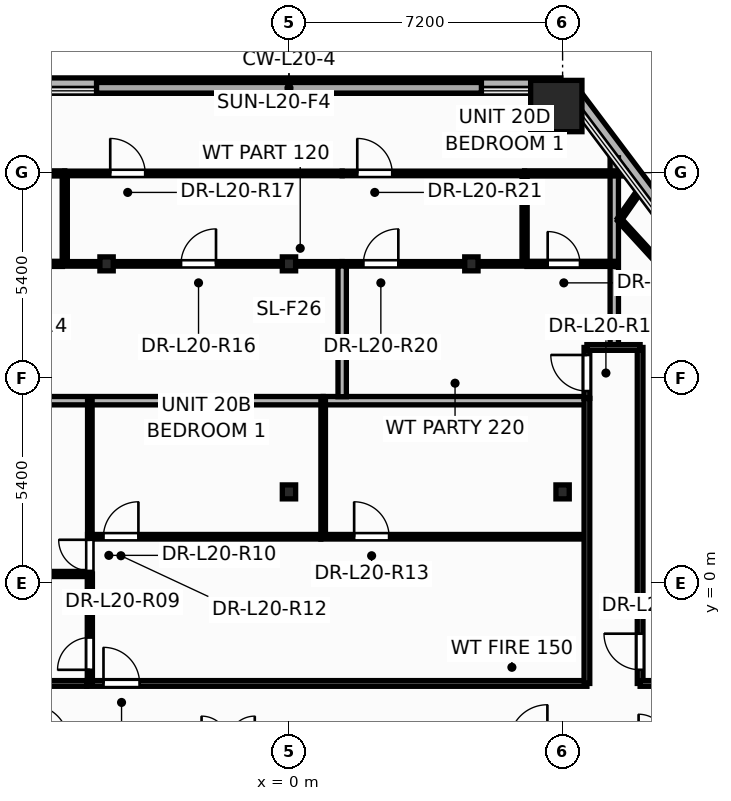
"""IFC4 building model, lengths in metres.
Left out: names, types, materials, properties, quantities, classifications, styles, units other than length and angle.
Written with IfcOpenShell. Run it as: python <this file> out.ifc"""

import sys

from ifc_helpers import new_model, si_unit, direction, frame, frame_2d, origin, origin_2d, place, context, subcontext, project, spatial, rectangle, hollow_rectangle, i_section, extrude, element, fill, save


model = new_model("IFC4")
c1 = context("Model", 3, precision=1e-05, world=origin(), true_north=direction((0.0, 1.0)))
c2 = subcontext(c1, "Body", "Model", "MODEL_VIEW")
j1 = project(units=[si_unit("LENGTHUNIT", "METRE"), si_unit("PLANEANGLEUNIT", "RADIAN")], contexts=[c1])
p1 = place(None, origin())
s1 = spatial("IfcSite", under=j1, at=p1, CompositionType="ELEMENT")
p2 = place(p1, origin())
s2 = spatial("IfcBuilding", under=s1, at=p2, CompositionType="ELEMENT")
p3 = place(p2, frame((0.0, 0.0, 79.2)))
s3 = spatial("IfcBuildingStorey", under=s2, at=p3, CompositionType="ELEMENT", Elevation=79.2)
p4 = place(p3, frame((7.034, 12.553, 0.0), z_axis=(0.0, 0.0, 1.0), x_axis=(1.0, 0.0, 0.0)))
e1 = element("IfcColumn", 1, at=p4, inside=s3, PredefinedType="COLUMN", context=c2, shape_type="SweptSolid", body=[
    extrude(hollow_rectangle(XDim=1.35, YDim=1.35, WallThickness=0.065, at=origin_2d()), origin(), (0.0, 0.0, 1.0), 3.6),
])
for number, where, z_axis, x_axis in (
    (2, (0.0, 2.4, 0.0), (0.0, 0.0, 1.0), (1.0, 0.0, 0.0)),
    (3, (7.2, 2.4, 0.0), (0.0, 0.0, 1.0), (1.0, 0.0, 0.0)),
    (4, (-4.8, 8.4, 0.0), (0.0, 0.0, 1.0), (1.0, 0.0, 0.0)),
    (5, (0.0, 8.4, 0.0), (0.0, 0.0, 1.0), (1.0, 0.0, 0.0)),
    (6, (4.8, 8.4, 0.0), (0.0, 0.0, 1.0), (1.0, 0.0, 0.0)),
):
    element("IfcColumn", number, at=place(p3, frame(where, z_axis=z_axis, x_axis=x_axis)), inside=s3, PredefinedType="COLUMN", context=c2, shape_type="SweptSolid", body=[
        extrude(i_section(OverallWidth=0.35, OverallDepth=0.367, WebThickness=0.025, FlangeThickness=0.032, at=origin_2d()), origin(), (0.0, 0.0, 1.0), 3.6),
    ])
p5 = place(p3, frame((15.148, 2.701, -0.2), z_axis=(0.0, 0.0, 1.0), x_axis=(-0.601235358398, 0.79907198913, 0.0)))
e7 = element("IfcWall", 7, at=p5, inside=s3, PredefinedType="PARAPET", context=c2, shape_type="SweptSolid", body=[
    extrude(rectangle(XDim=12.83, YDim=0.36, at=frame_2d((6.415, 0.0))), origin(), (0.0, 0.0, 1.0), 0.38),
])
p6 = place(p3, frame((7.154, 13.113, -0.2), z_axis=(0.0, 0.0, 1.0), x_axis=(-1.0, 0.0, 0.0)))
e8 = element("IfcWall", 8, at=p6, inside=s3, PredefinedType="PARAPET", context=c2, shape_type="SweptSolid", body=[
    extrude(rectangle(XDim=14.308, YDim=0.36, at=frame_2d((7.154, 0.0))), origin(), (0.0, 0.0, 1.0), 0.38),
])
p7 = place(p3, frame((-5.32, -2.64, 0.0), z_axis=(0.0, 0.0, 1.0), x_axis=(1.0, 0.0, 0.0)))
e9 = element("IfcWall", 9, at=p7, inside=s3, PredefinedType="PARTITIONING", context=c2, shape_type="SweptSolid", body=[
    extrude(rectangle(XDim=13.16, YDim=0.15, at=frame_2d((6.58, 0.0))), origin(), (0.0, 0.0, 1.0), 2.325),
])
p8 = place(p7, frame((0.439, 0.0, 0.0)))
e10 = element("IfcOpeningElement", 10, at=p8, cuts=e9, PredefinedType="OPENING", context=c2, shape_type="SweptSolid", body=[
    extrude(rectangle(XDim=0.956, YDim=2.104, at=frame_2d((0.475, 1.052))), frame((0.0, 0.085, 0.0), z_axis=(0.0, -1.0, 0.0), x_axis=(1.0, 0.0, 0.0)), (0.0, 0.0, 1.0), 0.17),
])
p9 = place(p3, frame((9.24, -2.64, 0.0), z_axis=(0.0, 0.0, 1.0), x_axis=(0.0, 1.0, 0.0)))
e11 = element("IfcWall", 11, at=p9, inside=s3, PredefinedType="PARTITIONING", context=c2, shape_type="SweptSolid", body=[
    extrude(rectangle(XDim=8.84, YDim=0.15, at=frame_2d((4.42, 0.0))), origin(), (0.0, 0.0, 1.0), 2.325),
])
p10 = place(p9, frame((0.359, 0.0, 0.0)))
e12 = element("IfcOpeningElement", 12, at=p10, cuts=e11, PredefinedType="OPENING", context=c2, shape_type="SweptSolid", body=[
    extrude(rectangle(XDim=0.956, YDim=2.104, at=frame_2d((0.475, 1.052))), frame((0.0, 0.085, 0.0), z_axis=(0.0, -1.0, 0.0), x_axis=(1.0, 0.0, 0.0)), (0.0, 0.0, 1.0), 0.17),
])
p11 = place(p3, frame((-5.96, 8.4, 0.0), z_axis=(0.0, 0.0, 1.0), x_axis=(1.0, 0.0, 0.0)))
e13 = element("IfcWall", 13, at=p11, inside=s3, PredefinedType="PARTITIONING", context=c2, shape_type="SweptSolid", body=[
    extrude(rectangle(XDim=7.36, YDim=0.12, at=frame_2d((3.68, 0.0))), origin(), (0.0, 0.0, 1.0), 2.325),
])
p12 = place(p11, frame((3.12, 0.0, 0.0)))
e14 = element("IfcOpeningElement", 14, at=p12, cuts=e13, PredefinedType="OPENING", context=c2, shape_type="SweptSolid", body=[
    extrude(rectangle(XDim=0.926, YDim=2.104, at=frame_2d((0.46, 1.052))), frame((0.0, 0.07, 0.0), z_axis=(0.0, -1.0, 0.0), x_axis=(1.0, 0.0, 0.0)), (0.0, 0.0, 1.0), 0.14),
])
p13 = place(p3, frame((-5.9, 10.78, 0.0), z_axis=(0.0, 0.0, 1.0), x_axis=(1.0, 0.0, 0.0)))
e15 = element("IfcWall", 15, at=p13, inside=s3, PredefinedType="PARTITIONING", context=c2, shape_type="SweptSolid", body=[
    extrude(rectangle(XDim=7.3, YDim=0.12, at=frame_2d((3.65, 0.0))), origin(), (0.0, 0.0, 1.0), 2.325),
])
p14 = place(p13, frame((1.197, 0.0, 0.0)))
e16 = element("IfcOpeningElement", 16, at=p14, cuts=e15, PredefinedType="OPENING", context=c2, shape_type="SweptSolid", body=[
    extrude(rectangle(XDim=0.926, YDim=2.104, at=frame_2d((0.46, 1.052))), frame((0.0, 0.07, 0.0), z_axis=(0.0, -1.0, 0.0), x_axis=(1.0, 0.0, 0.0)), (0.0, 0.0, 1.0), 0.14),
])
p15 = place(p3, frame((0.84, 1.22, 0.0), z_axis=(0.0, 0.0, 1.0), x_axis=(1.0, 0.0, 0.0)))
e17 = element("IfcWall", 17, at=p15, inside=s3, PredefinedType="PARTITIONING", context=c2, shape_type="SweptSolid", body=[
    extrude(rectangle(XDim=7.0, YDim=0.12, at=frame_2d((3.5, 0.0))), origin(), (0.0, 0.0, 1.0), 2.325),
])
p16 = place(p15, frame((0.875, 0.0, 0.0)))
e18 = element("IfcOpeningElement", 18, at=p16, cuts=e17, PredefinedType="OPENING", context=c2, shape_type="SweptSolid", body=[
    extrude(rectangle(XDim=0.926, YDim=2.104, at=frame_2d((0.46, 1.052))), frame((0.0, 0.07, 0.0), z_axis=(0.0, -1.0, 0.0), x_axis=(1.0, 0.0, 0.0)), (0.0, 0.0, 1.0), 0.14),
])
p17 = place(p3, frame((0.9, 4.8, 0.0), z_axis=(0.0, 0.0, 1.0), x_axis=(1.0, 0.0, 0.0)))
e19 = element("IfcWall", 19, at=p17, inside=s3, PredefinedType="PARTITIONING", context=c2, shape_type="SweptSolid", body=[
    extrude(rectangle(XDim=6.94, YDim=0.22, at=frame_2d((3.47, 0.0))), origin(), (0.0, 0.0, 1.0), 2.325),
])
p18 = place(p3, frame((-5.24, 1.22, 0.0), z_axis=(0.0, 0.0, 1.0), x_axis=(1.0, 0.0, 0.0)))
e20 = element("IfcWall", 20, at=p18, inside=s3, PredefinedType="PARTITIONING", context=c2, shape_type="SweptSolid", body=[
    extrude(rectangle(XDim=6.078, YDim=0.12, at=frame_2d((3.039, 0.0))), origin(), (0.0, 0.0, 1.0), 2.325),
])
p19 = place(p18, frame((0.358, 0.0, 0.0)))
e21 = element("IfcOpeningElement", 21, at=p19, cuts=e20, PredefinedType="OPENING", context=c2, shape_type="SweptSolid", body=[
    extrude(rectangle(XDim=0.926, YDim=2.104, at=frame_2d((0.46, 1.052))), frame((0.0, 0.07, 0.0), z_axis=(0.0, -1.0, 0.0), x_axis=(1.0, 0.0, 0.0)), (0.0, 0.0, 1.0), 0.14),
])
p20 = place(p3, frame((-7.84, 4.8, 0.0), z_axis=(0.0, 0.0, 1.0), x_axis=(1.0, 0.0, 0.0)))
e22 = element("IfcWall", 22, at=p20, inside=s3, PredefinedType="PARTITIONING", context=c2, shape_type="SweptSolid", body=[
    extrude(rectangle(XDim=8.74, YDim=0.22, at=frame_2d((4.37, 0.0))), origin(), (0.0, 0.0, 1.0), 2.325),
])
p21 = place(p3, frame((9.24, -2.64, 0.0), z_axis=(0.0, 0.0, 1.0), x_axis=(1.0, 0.0, 0.0)))
e23 = element("IfcWall", 23, at=p21, inside=s3, PredefinedType="PARTITIONING", context=c2, shape_type="SweptSolid", body=[
    extrude(rectangle(XDim=5.4, YDim=0.15, at=frame_2d((2.7, 0.0))), origin(), (0.0, 0.0, 1.0), 3.35),
])
p22 = place(p3, frame((1.4, 8.4, 0.0), z_axis=(0.0, 0.0, 1.0), x_axis=(1.0, 0.0, 0.0)))
e24 = element("IfcWall", 24, at=p22, inside=s3, PredefinedType="PARTITIONING", context=c2, shape_type="SweptSolid", body=[
    extrude(rectangle(XDim=4.86, YDim=0.12, at=frame_2d((2.43, 0.0))), origin(), (0.0, 0.0, 1.0), 2.325),
])
p23 = place(p22, frame((0.558, 0.0, 0.0)))
e25 = element("IfcOpeningElement", 25, at=p23, cuts=e24, PredefinedType="OPENING", context=c2, shape_type="SweptSolid", body=[
    extrude(rectangle(XDim=0.926, YDim=2.104, at=frame_2d((0.46, 1.052))), frame((0.0, 0.07, 0.0), z_axis=(0.0, -1.0, 0.0), x_axis=(1.0, 0.0, 0.0)), (0.0, 0.0, 1.0), 0.14),
])
p24 = place(p3, frame((1.4, 10.78, 0.0), z_axis=(0.0, 0.0, 1.0), x_axis=(1.0, 0.0, 0.0)))
e26 = element("IfcWall", 26, at=p24, inside=s3, PredefinedType="PARTITIONING", context=c2, shape_type="SweptSolid", body=[
    extrude(rectangle(XDim=4.8, YDim=0.12, at=frame_2d((2.4, 0.0))), origin(), (0.0, 0.0, 1.0), 2.325),
])
p25 = place(p24, frame((0.397, 0.0, 0.0)))
e27 = element("IfcOpeningElement", 27, at=p25, cuts=e26, PredefinedType="OPENING", context=c2, shape_type="SweptSolid", body=[
    extrude(rectangle(XDim=0.926, YDim=2.104, at=frame_2d((0.46, 1.052))), frame((0.0, 0.07, 0.0), z_axis=(0.0, -1.0, 0.0), x_axis=(1.0, 0.0, 0.0)), (0.0, 0.0, 1.0), 0.14),
])
p26 = place(p3, frame((7.84, -2.64, 0.0), z_axis=(0.0, 0.0, 1.0), x_axis=(0.0, 1.0, 0.0)))
e28 = element("IfcWall", 28, at=p26, inside=s3, PredefinedType="PARTITIONING", context=c2, shape_type="SweptSolid", body=[
    extrude(rectangle(XDim=7.5, YDim=0.15, at=frame_2d((3.75, 0.0))), origin(), (0.0, 0.0, 1.0), 2.325),
])
p27 = place(p3, frame((-5.24, 1.16, 0.0), z_axis=(0.0, 0.0, 1.0), x_axis=(0.0, 1.0, 0.0)))
e29 = element("IfcWall", 29, at=p27, inside=s3, PredefinedType="PARTITIONING", context=c2, shape_type="SweptSolid", body=[
    extrude(rectangle(XDim=3.64, YDim=0.12, at=frame_2d((1.82, 0.0))), origin(), (0.0, 0.0, 1.0), 2.325),
])
p28 = place(p3, frame((1.4, 4.905, 0.0), z_axis=(0.0, 0.0, 1.0), x_axis=(0.0, 1.0, 0.0)))
e30 = element("IfcWall", 30, at=p28, inside=s3, PredefinedType="PARTITIONING", context=c2, shape_type="SweptSolid", body=[
    extrude(rectangle(XDim=3.44, YDim=0.22, at=frame_2d((1.72, 0.0))), origin(), (0.0, 0.0, 1.0), 2.325),
])
p29 = place(p3, frame((0.9, 1.22, 0.0), z_axis=(0.0, 0.0, 1.0), x_axis=(0.0, 1.0, 0.0)))
e31 = element("IfcWall", 31, at=p29, inside=s3, PredefinedType="PARTITIONING", context=c2, shape_type="SweptSolid", body=[
    extrude(rectangle(XDim=3.58, YDim=0.12, at=frame_2d((1.79, 0.0))), origin(), (0.0, 0.0, 1.0), 2.325),
])
p30 = place(p3, frame((-8.869, 10.78, 0.0), z_axis=(0.0, 0.0, 1.0), x_axis=(1.0, 0.0, 0.0)))
e32 = element("IfcWall", 32, at=p30, inside=s3, PredefinedType="PARTITIONING", context=c2, shape_type="SweptSolid", body=[
    extrude(rectangle(XDim=2.969, YDim=0.135, at=frame_2d((1.484, 0.0))), origin(), (0.0, 0.0, 1.0), 2.325),
])
p31 = place(p3, frame((-5.24, -2.64, 0.0), z_axis=(0.0, 0.0, 1.0), x_axis=(0.0, 1.0, 0.0)))
e33 = element("IfcWall", 33, at=p31, inside=s3, PredefinedType="PARTITIONING", context=c2, shape_type="SweptSolid", body=[
    extrude(rectangle(XDim=2.88, YDim=0.135, at=frame_2d((1.44, 0.0))), origin(), (0.0, 0.0, 1.0), 3.35),
])
p32 = place(p31, frame((0.359, 0.0, 0.0)))
e34 = element("IfcOpeningElement", 34, at=p32, cuts=e33, PredefinedType="OPENING", context=c2, shape_type="SweptSolid", body=[
    extrude(rectangle(XDim=0.856, YDim=2.104, at=frame_2d((0.425, 1.052))), frame((0.0, 0.078, 0.0), z_axis=(0.0, -1.0, 0.0), x_axis=(1.0, 0.0, 0.0)), (0.0, 0.0, 1.0), 0.155),
])
p33 = place(p3, frame((8.56, 6.2, 0.0), z_axis=(0.0, 0.0, 1.0), x_axis=(0.0, 1.0, 0.0)))
e35 = element("IfcWall", 35, at=p33, inside=s3, PredefinedType="PARTITIONING", context=c2, shape_type="SweptSolid", body=[
    extrude(rectangle(XDim=4.991, YDim=0.22, at=frame_2d((2.495, 0.0))), origin(), (0.0, 0.0, 1.0), 2.325),
])
p34 = place(p3, frame((-8.56, 8.4, 0.0), z_axis=(0.0, 0.0, 1.0), x_axis=(1.0, 0.0, 0.0)))
e36 = element("IfcWall", 36, at=p34, inside=s3, PredefinedType="PARTITIONING", context=c2, shape_type="SweptSolid", body=[
    extrude(rectangle(XDim=2.598, YDim=0.135, at=frame_2d((1.299, 0.0))), origin(), (0.0, 0.0, 1.0), 3.35),
])
p35 = place(p34, frame((0.398, 0.0, 0.0)))
e37 = element("IfcOpeningElement", 37, at=p35, cuts=e36, PredefinedType="OPENING", context=c2, shape_type="SweptSolid", body=[
    extrude(rectangle(XDim=0.856, YDim=2.104, at=frame_2d((0.425, 1.052))), frame((0.0, 0.078, 0.0), z_axis=(0.0, -1.0, 0.0), x_axis=(1.0, 0.0, 0.0)), (0.0, 0.0, 1.0), 0.155),
])
p36 = place(p3, frame((6.2, 10.78, 0.0), z_axis=(0.0, 0.0, 1.0), x_axis=(1.0, 0.0, 0.0)))
e38 = element("IfcWall", 38, at=p36, inside=s3, PredefinedType="PARTITIONING", context=c2, shape_type="SweptSolid", body=[
    extrude(rectangle(XDim=2.669, YDim=0.135, at=frame_2d((1.334, 0.0))), origin(), (0.0, 0.0, 1.0), 2.713),
])
p37 = place(p3, frame((-7.84, -2.64, 0.0), z_axis=(0.0, 0.0, 1.0), x_axis=(1.0, 0.0, 0.0)))
e39 = element("IfcWall", 39, at=p37, inside=s3, PredefinedType="PARTITIONING", context=c2, shape_type="SweptSolid", body=[
    extrude(rectangle(XDim=2.518, YDim=0.15, at=frame_2d((1.259, 0.0))), origin(), (0.0, 0.0, 1.0), 2.325),
])
p38 = place(p3, frame((10.472, 7.627, 0.0), z_axis=(0.0, 0.0, 1.0), x_axis=(-0.675779241876, 0.737104074232, 0.0)))
e40 = element("IfcWall", 40, at=p38, inside=s3, PredefinedType="PARTITIONING", context=c2, shape_type="SweptSolid", body=[
    extrude(rectangle(XDim=2.632, YDim=0.12, at=frame_2d((1.316, 0.0))), origin(), (0.0, 0.0, 1.0), 3.35),
])
p39 = place(p3, frame((-7.84, 0.24, 0.0), z_axis=(0.0, 0.0, 1.0), x_axis=(1.0, 0.0, 0.0)))
e41 = element("IfcWall", 41, at=p39, inside=s3, PredefinedType="PARTITIONING", context=c2, shape_type="SweptSolid", body=[
    extrude(rectangle(XDim=2.6, YDim=0.135, at=frame_2d((1.3, 0.0))), origin(), (0.0, 0.0, 1.0), 2.325),
])
p40 = place(p3, frame((6.262, 8.4, 0.0), z_axis=(0.0, 0.0, 1.0), x_axis=(1.0, 0.0, 0.0)))
e42 = element("IfcWall", 42, at=p40, inside=s3, PredefinedType="PARTITIONING", context=c2, shape_type="SweptSolid", body=[
    extrude(rectangle(XDim=2.298, YDim=0.135, at=frame_2d((1.149, 0.0))), origin(), (0.0, 0.0, 1.0), 3.35),
])
p41 = place(p40, frame((0.546, 0.0, 0.0)))
e43 = element("IfcOpeningElement", 43, at=p41, cuts=e42, PredefinedType="OPENING", context=c2, shape_type="SweptSolid", body=[
    extrude(rectangle(XDim=0.856, YDim=2.104, at=frame_2d((0.425, 1.052))), frame((0.0, 0.078, 0.0), z_axis=(0.0, -1.0, 0.0), x_axis=(1.0, 0.0, 0.0)), (0.0, 0.0, 1.0), 0.155),
])
p42 = place(p3, frame((-5.9, 8.4, 0.0), z_axis=(0.0, 0.0, 1.0), x_axis=(0.0, 1.0, 0.0)))
e44 = element("IfcWall", 44, at=p42, inside=s3, PredefinedType="PARTITIONING", context=c2, shape_type="SweptSolid", body=[
    extrude(rectangle(XDim=2.38, YDim=0.135, at=frame_2d((1.19, 0.0))), origin(), (0.0, 0.0, 1.0), 2.325),
])
p43 = place(p3, frame((6.2, 8.4, 0.0), z_axis=(0.0, 0.0, 1.0), x_axis=(0.0, 1.0, 0.0)))
e45 = element("IfcWall", 45, at=p43, inside=s3, PredefinedType="PARTITIONING", context=c2, shape_type="SweptSolid", body=[
    extrude(rectangle(XDim=2.38, YDim=0.135, at=frame_2d((1.19, 0.0))), origin(), (0.0, 0.0, 1.0), 3.35),
])
p44 = place(p3, frame((7.84, 4.862, 0.0), z_axis=(0.0, 0.0, 1.0), x_axis=(0.0, 1.0, 0.0)))
e46 = element("IfcWall", 46, at=p44, inside=s3, PredefinedType="PARTITIONING", context=c2, shape_type="SweptSolid", body=[
    extrude(rectangle(XDim=1.338, YDim=0.15, at=frame_2d((0.669, 0.0))), origin(), (0.0, 0.0, 1.0), 3.35),
])
p45 = place(p44, frame((0.191, 0.0, 0.0)))
e47 = element("IfcOpeningElement", 47, at=p45, cuts=e46, PredefinedType="OPENING", context=c2, shape_type="SweptSolid", body=[
    extrude(rectangle(XDim=0.956, YDim=2.104, at=frame_2d((0.475, 1.052))), frame((0.0, 0.085, 0.0), z_axis=(0.0, -1.0, 0.0), x_axis=(1.0, 0.0, 0.0)), (0.0, 0.0, 1.0), 0.17),
])
p46 = place(p3, frame((-5.24, 0.24, 0.0), z_axis=(0.0, 0.0, 1.0), x_axis=(0.0, 1.0, 0.0)))
e48 = element("IfcWall", 48, at=p46, inside=s3, PredefinedType="PARTITIONING", context=c2, shape_type="SweptSolid", body=[
    extrude(rectangle(XDim=1.04, YDim=0.12, at=frame_2d((0.52, 0.0))), origin(), (0.0, 0.0, 1.0), 3.35),
])
p47 = place(p46, frame((0.08, 0.0, 0.0)))
e49 = element("IfcOpeningElement", 49, at=p47, cuts=e48, PredefinedType="OPENING", context=c2, shape_type="SweptSolid", body=[
    extrude(rectangle(XDim=0.826, YDim=2.104, at=frame_2d((0.41, 1.052))), frame((0.0, 0.07, 0.0), z_axis=(0.0, -1.0, 0.0), x_axis=(1.0, 0.0, 0.0)), (0.0, 0.0, 1.0), 0.14),
])
p48 = place(p3, frame((8.694, 9.566, 0.0), z_axis=(0.0, 0.0, 1.0), x_axis=(0.574241580185, 0.818685902888, 0.0)))
e50 = element("IfcWall", 50, at=p48, inside=s3, PredefinedType="PARTITIONING", context=c2, shape_type="SweptSolid", body=[
    extrude(rectangle(XDim=0.904, YDim=0.12, at=frame_2d((0.452, 0.0))), origin(), (0.0, 0.0, 1.0), 2.713),
])
p49 = place(p3, frame((7.84, 6.2, 0.0), z_axis=(0.0, 0.0, 1.0), x_axis=(1.0, 0.0, 0.0)))
e51 = element("IfcWall", 51, at=p49, inside=s3, PredefinedType="PARTITIONING", context=c2, shape_type="SweptSolid", body=[
    extrude(rectangle(XDim=1.4, YDim=0.15, at=frame_2d((0.7, 0.0))), origin(), (0.0, 0.0, 1.0), 3.35),
])
p50 = place(p32, origin())
e52 = element("IfcDoor", 52, at=p50, inside=s3, OperationType="SINGLE_SWING_LEFT", PredefinedType="DOOR", context=c2, shape_type="SweptSolid", body=[
    extrude(rectangle(XDim=0.85, YDim=2.1, at=frame_2d((0.425, 1.05))), frame((0.0, 0.025, 0.0), z_axis=(0.0, -1.0, 0.0), x_axis=(1.0, 0.0, 0.0)), (0.0, 0.0, 1.0), 0.05),
])
fill(e34, e52)
p51 = place(p47, origin())
e53 = element("IfcDoor", 53, at=p51, inside=s3, OperationType="SINGLE_SWING_RIGHT", PredefinedType="DOOR", context=c2, shape_type="SweptSolid", body=[
    extrude(rectangle(XDim=0.82, YDim=2.1, at=frame_2d((0.41, 1.05))), frame((0.0, 0.025, 0.0), z_axis=(0.0, -1.0, 0.0), x_axis=(1.0, 0.0, 0.0)), (0.0, 0.0, 1.0), 0.05),
])
fill(e49, e53)
p52 = place(p8, origin())
e54 = element("IfcDoor", 54, at=p52, inside=s3, OperationType="SINGLE_SWING_LEFT", PredefinedType="DOOR", context=c2, shape_type="SweptSolid", body=[
    extrude(rectangle(XDim=0.95, YDim=2.1, at=frame_2d((0.475, 1.05))), frame((0.0, 0.025, 0.0), z_axis=(0.0, -1.0, 0.0), x_axis=(1.0, 0.0, 0.0)), (0.0, 0.0, 1.0), 0.05),
])
fill(e10, e54)
p53 = place(p19, origin())
e55 = element("IfcDoor", 55, at=p53, inside=s3, OperationType="SINGLE_SWING_RIGHT", PredefinedType="DOOR", context=c2, shape_type="SweptSolid", body=[
    extrude(rectangle(XDim=0.92, YDim=2.1, at=frame_2d((0.46, 1.05))), frame((0.0, 0.025, 0.0), z_axis=(0.0, -1.0, 0.0), x_axis=(1.0, 0.0, 0.0)), (0.0, 0.0, 1.0), 0.05),
])
fill(e21, e55)
p54 = place(p16, origin())
e56 = element("IfcDoor", 56, at=p54, inside=s3, OperationType="SINGLE_SWING_LEFT", PredefinedType="DOOR", context=c2, shape_type="SweptSolid", body=[
    extrude(rectangle(XDim=0.92, YDim=2.1, at=frame_2d((0.46, 1.05))), frame((0.0, 0.025, 0.0), z_axis=(0.0, -1.0, 0.0), x_axis=(1.0, 0.0, 0.0)), (0.0, 0.0, 1.0), 0.05),
])
fill(e18, e56)
p55 = place(p12, origin())
e57 = element("IfcDoor", 57, at=p55, inside=s3, OperationType="SINGLE_SWING_RIGHT", PredefinedType="DOOR", context=c2, shape_type="SweptSolid", body=[
    extrude(rectangle(XDim=0.92, YDim=2.1, at=frame_2d((0.46, 1.05))), frame((0.0, 0.025, 0.0), z_axis=(0.0, -1.0, 0.0), x_axis=(1.0, 0.0, 0.0)), (0.0, 0.0, 1.0), 0.05),
])
fill(e14, e57)
p56 = place(p14, origin())
e58 = element("IfcDoor", 58, at=p56, inside=s3, OperationType="SINGLE_SWING_LEFT", PredefinedType="DOOR", context=c2, shape_type="SweptSolid", body=[
    extrude(rectangle(XDim=0.92, YDim=2.1, at=frame_2d((0.46, 1.05))), frame((0.0, 0.025, 0.0), z_axis=(0.0, -1.0, 0.0), x_axis=(1.0, 0.0, 0.0)), (0.0, 0.0, 1.0), 0.05),
])
fill(e16, e58)
p57 = place(p45, origin())
e59 = element("IfcDoor", 59, at=p57, inside=s3, OperationType="SINGLE_SWING_RIGHT", PredefinedType="DOOR", context=c2, shape_type="SweptSolid", body=[
    extrude(rectangle(XDim=0.95, YDim=2.1, at=frame_2d((0.475, 1.05))), frame((0.0, 0.025, 0.0), z_axis=(0.0, -1.0, 0.0), x_axis=(1.0, 0.0, 0.0)), (0.0, 0.0, 1.0), 0.05),
])
fill(e47, e59)
p58 = place(p41, origin())
e60 = element("IfcDoor", 60, at=p58, inside=s3, OperationType="SINGLE_SWING_LEFT", PredefinedType="DOOR", context=c2, shape_type="SweptSolid", body=[
    extrude(rectangle(XDim=0.85, YDim=2.1, at=frame_2d((0.425, 1.05))), frame((0.0, 0.025, 0.0), z_axis=(0.0, -1.0, 0.0), x_axis=(1.0, 0.0, 0.0)), (0.0, 0.0, 1.0), 0.05),
])
fill(e43, e60)
p59 = place(p23, origin())
e61 = element("IfcDoor", 61, at=p59, inside=s3, OperationType="SINGLE_SWING_RIGHT", PredefinedType="DOOR", context=c2, shape_type="SweptSolid", body=[
    extrude(rectangle(XDim=0.92, YDim=2.1, at=frame_2d((0.46, 1.05))), frame((0.0, 0.025, 0.0), z_axis=(0.0, -1.0, 0.0), x_axis=(1.0, 0.0, 0.0)), (0.0, 0.0, 1.0), 0.05),
])
fill(e25, e61)
p60 = place(p25, origin())
e62 = element("IfcDoor", 62, at=p60, inside=s3, OperationType="SINGLE_SWING_LEFT", PredefinedType="DOOR", context=c2, shape_type="SweptSolid", body=[
    extrude(rectangle(XDim=0.92, YDim=2.1, at=frame_2d((0.46, 1.05))), frame((0.0, 0.025, 0.0), z_axis=(0.0, -1.0, 0.0), x_axis=(1.0, 0.0, 0.0)), (0.0, 0.0, 1.0), 0.05),
])
fill(e27, e62)
p61 = place(p10, origin())
e63 = element("IfcDoor", 63, at=p61, inside=s3, OperationType="SINGLE_SWING_RIGHT", PredefinedType="DOOR", context=c2, shape_type="SweptSolid", body=[
    extrude(rectangle(XDim=0.95, YDim=2.1, at=frame_2d((0.475, 1.05))), frame((0.0, 0.025, 0.0), z_axis=(0.0, -1.0, 0.0), x_axis=(1.0, 0.0, 0.0)), (0.0, 0.0, 1.0), 0.05),
])
fill(e12, e63)
save(model, sys.argv[1])
